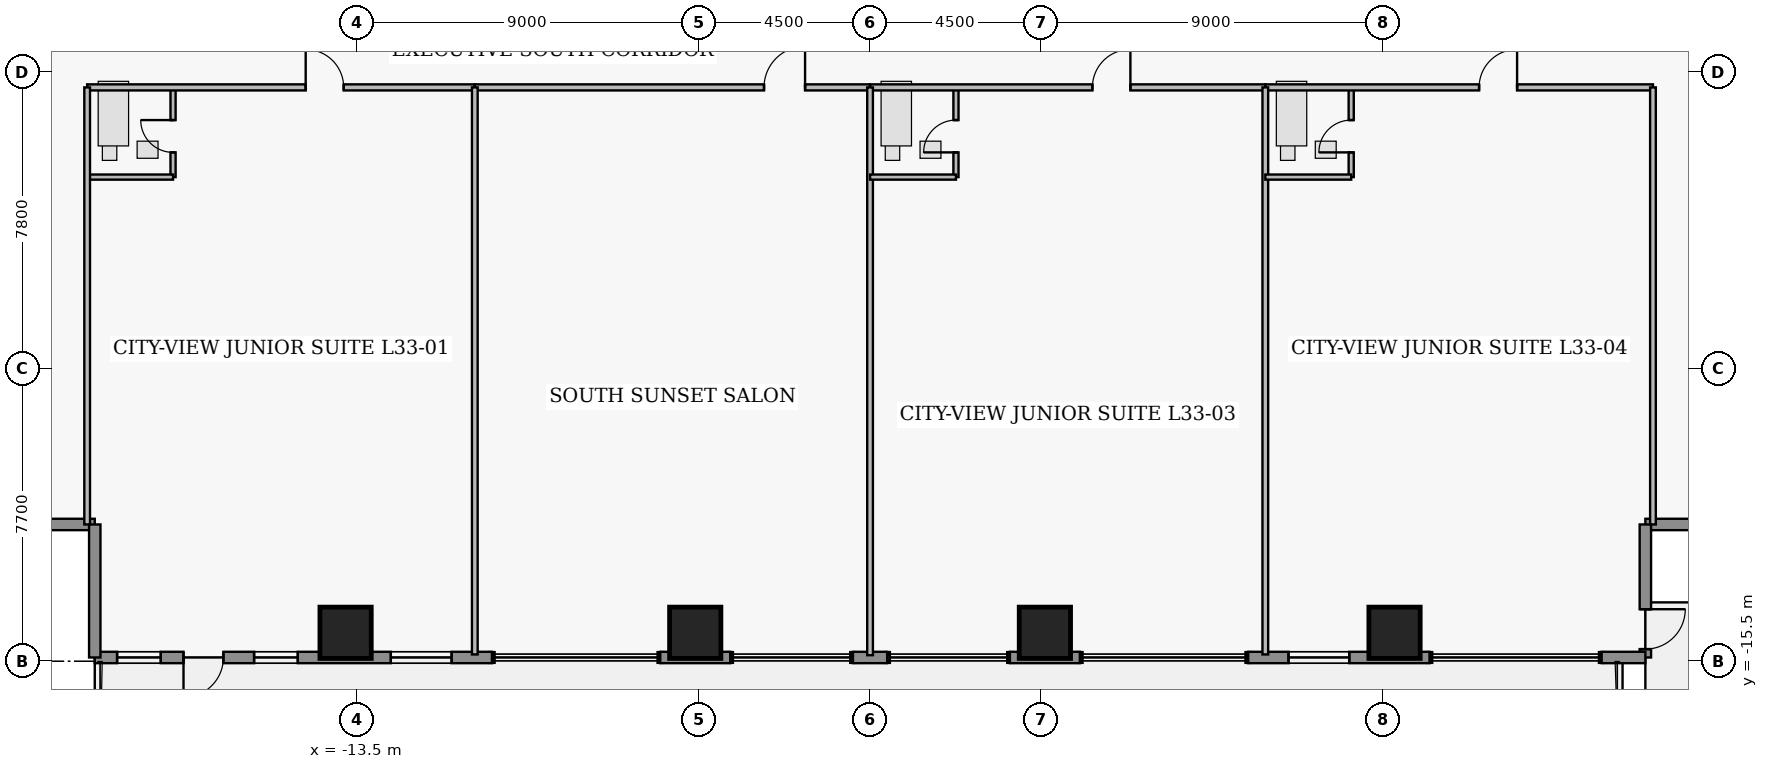
"""IFC4 building model, lengths in metres.
Left out: names, types, materials, properties, quantities, classifications, styles, units other than length and angle.
Written with IfcOpenShell. Run it as: python <this file> out.ifc"""

import sys

from ifc_helpers import new_model, si_unit, direction, frame, frame_2d, origin, origin_2d, place, context, subcontext, project, spatial, rectangle, extrude, element, fill, save


model = new_model("IFC4")
c1 = context("Model", 3, precision=1e-05, world=origin(), true_north=direction((0.0, 1.0)))
c2 = subcontext(c1, "Body", "Model", "MODEL_VIEW")
j1 = project(units=[si_unit("LENGTHUNIT", "METRE"), si_unit("PLANEANGLEUNIT", "RADIAN")], contexts=[c1])
p1 = place(None, origin())
s1 = spatial("IfcSite", under=j1, at=p1, CompositionType="ELEMENT")
p2 = place(p1, origin())
s2 = spatial("IfcBuilding", under=s1, at=p2, CompositionType="ELEMENT")
p3 = place(p2, frame((0.0, 0.0, 132.15)))
s3 = spatial("IfcBuildingStorey", under=s2, at=p3, CompositionType="ELEMENT", Elevation=132.15)
for number, where, z_axis, x_axis in (
    (1, (-13.8, -14.75, 0.0), (0.0, 0.0, 1.0), (1.0, 0.0, 0.0)),
    (2, (-4.6, -14.75, 0.0), (0.0, 0.0, 1.0), (1.0, 0.0, 0.0)),
    (3, (4.6, -14.75, 0.0), (0.0, 0.0, 1.0), (1.0, 0.0, 0.0)),
    (4, (13.8, -14.75, 0.0), (0.0, 0.0, 1.0), (1.0, 0.0, 0.0)),
):
    element("IfcColumn", number, at=place(p3, frame(where, z_axis=z_axis, x_axis=x_axis)), inside=s3, PredefinedType="COLUMN", context=c2, shape_type="SweptSolid", body=[
        extrude(rectangle(XDim=1.35, YDim=1.35, at=origin_2d()), origin(), (0.0, 0.0, 1.0), 3.65),
    ])
for number, where, z_axis, x_axis in (
    (5, (-20.4, -11.9, 0.0), (0.0, 0.0, 1.0), (-1.0, 0.0, 0.0)),
    (6, (23.9, -11.9, 0.0), (0.0, 0.0, 1.0), (-1.0, 0.0, 0.0)),
):
    element("IfcWall", number, at=place(p3, frame(where, z_axis=z_axis, x_axis=x_axis)), inside=s3, PredefinedType="STANDARD", context=c2, shape_type="SweptSolid", body=[
        extrude(rectangle(XDim=3.5, YDim=0.3, at=frame_2d((1.75, 0.0))), origin(), (0.0, 0.0, 1.0), 3.43),
    ])
p4 = place(p3, frame((20.4, -11.9, 0.0), z_axis=(0.0, 0.0, 1.0), x_axis=(0.0, -1.0, 0.0)))
e7 = element("IfcWall", 7, at=p4, inside=s3, PredefinedType="STANDARD", context=c2, shape_type="SweptSolid", body=[
    extrude(rectangle(XDim=3.5, YDim=0.3, at=frame_2d((1.75, 0.0))), origin(), (0.0, 0.0, 1.0), 3.43),
])
p5 = place(p4, frame((2.23, 0.0, 0.0)))
e8 = element("IfcOpeningElement", 8, at=p5, cuts=e7, PredefinedType="OPENING", context=c2, shape_type="SweptSolid", body=[
    extrude(rectangle(XDim=1.05, YDim=2.2, at=frame_2d((0.525, 1.1))), frame((0.0, 0.16, 0.0), z_axis=(0.0, -1.0, 0.0), x_axis=(1.0, 0.0, 0.0)), (0.0, 0.0, 1.0), 0.32),
])
p6 = place(p3, frame((20.4, -15.4, 0.0), z_axis=(0.0, 0.0, 1.0), x_axis=(-1.0, 0.0, 0.0)))
e9 = element("IfcWall", 9, at=p6, inside=s3, PredefinedType="STANDARD", context=c2, shape_type="SweptSolid", body=[
    extrude(rectangle(XDim=1.15, YDim=0.3, at=frame_2d((0.575, 0.0))), origin(), (0.0, 0.0, 1.0), 3.43),
])
p7 = place(p3, frame((14.72, -15.4, 0.0), z_axis=(0.0, 0.0, 1.0), x_axis=(-1.0, 0.0, 0.0)))
e10 = element("IfcWall", 10, at=p7, inside=s3, PredefinedType="STANDARD", context=c2, shape_type="SweptSolid", body=[
    extrude(rectangle(XDim=4.77, YDim=0.3, at=frame_2d((2.385, 0.0))), origin(), (0.0, 0.0, 1.0), 3.43),
])
p8 = place(p7, frame((2.11, 0.0, 0.85)))
e11 = element("IfcOpeningElement", 11, at=p8, cuts=e10, PredefinedType="OPENING", context=c2, shape_type="SweptSolid", body=[
    extrude(rectangle(XDim=1.6, YDim=1.8, at=frame_2d((0.8, 0.9))), frame((0.0, 0.16, 0.0), z_axis=(0.0, -1.0, 0.0), x_axis=(1.0, 0.0, 0.0)), (0.0, 0.0, 1.0), 0.32),
])
p9 = place(p3, frame((5.52, -15.4, 0.0), z_axis=(0.0, 0.0, 1.0), x_axis=(-1.0, 0.0, 0.0)))
e12 = element("IfcWall", 12, at=p9, inside=s3, PredefinedType="STANDARD", context=c2, shape_type="SweptSolid", body=[
    extrude(rectangle(XDim=1.84, YDim=0.3, at=frame_2d((0.92, 0.0))), origin(), (0.0, 0.0, 1.0), 3.43),
])
p10 = place(p3, frame((0.45, -15.4, 0.0), z_axis=(0.0, 0.0, 1.0), x_axis=(-1.0, 0.0, 0.0)))
e13 = element("IfcWall", 13, at=p10, inside=s3, PredefinedType="STANDARD", context=c2, shape_type="SweptSolid", body=[
    extrude(rectangle(XDim=0.9, YDim=0.3, at=frame_2d((0.45, 0.0))), origin(), (0.0, 0.0, 1.0), 3.43),
])
p11 = place(p3, frame((-3.68, -15.4, 0.0), z_axis=(0.0, 0.0, 1.0), x_axis=(-1.0, 0.0, 0.0)))
e14 = element("IfcWall", 14, at=p11, inside=s3, PredefinedType="STANDARD", context=c2, shape_type="SweptSolid", body=[
    extrude(rectangle(XDim=1.84, YDim=0.3, at=frame_2d((0.92, 0.0))), origin(), (0.0, 0.0, 1.0), 3.43),
])
p12 = place(p3, frame((-9.95, -15.4, 0.0), z_axis=(0.0, 0.0, 1.0), x_axis=(-1.0, 0.0, 0.0)))
e15 = element("IfcWall", 15, at=p12, inside=s3, PredefinedType="STANDARD", context=c2, shape_type="SweptSolid", body=[
    extrude(rectangle(XDim=10.45, YDim=0.3, at=frame_2d((5.225, 0.0))), origin(), (0.0, 0.0, 1.0), 3.43),
])
p13 = place(p12, frame((7.065, 0.0, 0.0)))
e16 = element("IfcOpeningElement", 16, at=p13, cuts=e15, PredefinedType="OPENING", context=c2, shape_type="SweptSolid", body=[
    extrude(rectangle(XDim=1.05, YDim=2.2, at=frame_2d((0.525, 1.1))), frame((0.0, 0.16, 0.0), z_axis=(0.0, -1.0, 0.0), x_axis=(1.0, 0.0, 0.0)), (0.0, 0.0, 1.0), 0.32),
])
p14 = place(p12, frame((1.06, 0.0, 0.85)))
e17 = element("IfcOpeningElement", 17, at=p14, cuts=e15, PredefinedType="OPENING", context=c2, shape_type="SweptSolid", body=[
    extrude(rectangle(XDim=1.6, YDim=1.8, at=frame_2d((0.8, 0.9))), frame((0.0, 0.16, 0.0), z_axis=(0.0, -1.0, 0.0), x_axis=(1.0, 0.0, 0.0)), (0.0, 0.0, 1.0), 0.32),
])
p15 = place(p12, frame((5.107, 0.0, 0.95)))
e18 = element("IfcOpeningElement", 18, at=p15, cuts=e15, PredefinedType="OPENING", context=c2, shape_type="SweptSolid", body=[
    extrude(rectangle(XDim=1.15, YDim=1.55, at=frame_2d((0.575, 0.775))), frame((0.0, 0.16, 0.0), z_axis=(0.0, -1.0, 0.0), x_axis=(1.0, 0.0, 0.0)), (0.0, 0.0, 1.0), 0.32),
])
p16 = place(p12, frame((8.712, 0.0, 0.95)))
e19 = element("IfcOpeningElement", 19, at=p16, cuts=e15, PredefinedType="OPENING", context=c2, shape_type="SweptSolid", body=[
    extrude(rectangle(XDim=1.15, YDim=1.55, at=frame_2d((0.575, 0.775))), frame((0.0, 0.16, 0.0), z_axis=(0.0, -1.0, 0.0), x_axis=(1.0, 0.0, 0.0)), (0.0, 0.0, 1.0), 0.32),
])
p17 = place(p3, frame((-20.4, -15.4, 0.0), z_axis=(0.0, 0.0, 1.0), x_axis=(0.0, 1.0, 0.0)))
e20 = element("IfcWall", 20, at=p17, inside=s3, PredefinedType="STANDARD", context=c2, shape_type="SweptSolid", body=[
    extrude(rectangle(XDim=3.5, YDim=0.3, at=frame_2d((1.75, 0.0))), origin(), (0.0, 0.0, 1.0), 3.43),
])
p18 = place(p3, frame((-18.34, -2.76, 0.0), z_axis=(0.0, 0.0, 1.0), x_axis=(0.0, 1.0, 0.0)))
e21 = element("IfcWall", 21, at=p18, inside=s3, PredefinedType="PLUMBINGWALL", context=c2, shape_type="SweptSolid", body=[
    extrude(rectangle(XDim=2.36, YDim=0.135, at=frame_2d((1.18, 0.0))), origin(), (0.0, 0.0, 1.0), 3.43),
])
p19 = place(p18, frame((0.65, 0.0, 0.0)))
e22 = element("IfcOpeningElement", 22, at=p19, cuts=e21, PredefinedType="OPENING", context=c2, shape_type="SweptSolid", body=[
    extrude(rectangle(XDim=0.85, YDim=2.1, at=frame_2d((0.425, 1.05))), frame((0.0, 0.077, 0.0), z_axis=(0.0, -1.0, 0.0), x_axis=(1.0, 0.0, 0.0)), (0.0, 0.0, 1.0), 0.155),
])
p20 = place(p3, frame((-20.6, -0.4, 0.0), z_axis=(0.0, 0.0, 1.0), x_axis=(1.0, 0.0, 0.0)))
e23 = element("IfcWall", 23, at=p20, inside=s3, PredefinedType="PARTITIONING", context=c2, shape_type="SweptSolid", body=[
    extrude(rectangle(XDim=10.2, YDim=0.16, at=frame_2d((5.1, 0.0))), origin(), (0.0, 0.0, 1.0), 3.43),
])
p21 = place(p20, frame((5.75, 0.0, 0.0)))
e24 = element("IfcOpeningElement", 24, at=p21, cuts=e23, PredefinedType="OPENING", context=c2, shape_type="SweptSolid", body=[
    extrude(rectangle(XDim=1.0, YDim=2.15, at=frame_2d((0.5, 1.075))), frame((0.0, 0.09, 0.0), z_axis=(0.0, -1.0, 0.0), x_axis=(1.0, 0.0, 0.0)), (0.0, 0.0, 1.0), 0.18),
])
p22 = place(p3, frame((-10.4, -0.4, 0.0), z_axis=(0.0, 0.0, 1.0), x_axis=(1.0, 0.0, 0.0)))
e25 = element("IfcWall", 25, at=p22, inside=s3, PredefinedType="PARTITIONING", context=c2, shape_type="SweptSolid", body=[
    extrude(rectangle(XDim=10.4, YDim=0.16, at=frame_2d((5.2, 0.0))), origin(), (0.0, 0.0, 1.0), 3.43),
])
p23 = place(p22, frame((7.61, 0.0, 0.0)))
e26 = element("IfcOpeningElement", 26, at=p23, cuts=e25, PredefinedType="OPENING", context=c2, shape_type="SweptSolid", body=[
    extrude(rectangle(XDim=1.08, YDim=2.18, at=frame_2d((0.54, 1.09))), frame((0.0, 0.09, 0.0), z_axis=(0.0, -1.0, 0.0), x_axis=(1.0, 0.0, 0.0)), (0.0, 0.0, 1.0), 0.18),
])
p24 = place(p3, frame((2.26, -2.76, 0.0), z_axis=(0.0, 0.0, 1.0), x_axis=(0.0, 1.0, 0.0)))
e27 = element("IfcWall", 27, at=p24, inside=s3, PredefinedType="PLUMBINGWALL", context=c2, shape_type="SweptSolid", body=[
    extrude(rectangle(XDim=2.36, YDim=0.135, at=frame_2d((1.18, 0.0))), origin(), (0.0, 0.0, 1.0), 3.43),
])
p25 = place(p24, frame((0.65, 0.0, 0.0)))
e28 = element("IfcOpeningElement", 28, at=p25, cuts=e27, PredefinedType="OPENING", context=c2, shape_type="SweptSolid", body=[
    extrude(rectangle(XDim=0.85, YDim=2.1, at=frame_2d((0.425, 1.05))), frame((0.0, 0.077, 0.0), z_axis=(0.0, -1.0, 0.0), x_axis=(1.0, 0.0, 0.0)), (0.0, 0.0, 1.0), 0.155),
])
p26 = place(p3, frame((0.0, -0.4, 0.0), z_axis=(0.0, 0.0, 1.0), x_axis=(1.0, 0.0, 0.0)))
e29 = element("IfcWall", 29, at=p26, inside=s3, PredefinedType="PARTITIONING", context=c2, shape_type="SweptSolid", body=[
    extrude(rectangle(XDim=10.4, YDim=0.16, at=frame_2d((5.2, 0.0))), origin(), (0.0, 0.0, 1.0), 3.43),
])
p27 = place(p26, frame((5.85, 0.0, 0.0)))
e30 = element("IfcOpeningElement", 30, at=p27, cuts=e29, PredefinedType="OPENING", context=c2, shape_type="SweptSolid", body=[
    extrude(rectangle(XDim=1.0, YDim=2.15, at=frame_2d((0.5, 1.075))), frame((0.0, 0.09, 0.0), z_axis=(0.0, -1.0, 0.0), x_axis=(1.0, 0.0, 0.0)), (0.0, 0.0, 1.0), 0.18),
])
p28 = place(p3, frame((12.66, -2.76, 0.0), z_axis=(0.0, 0.0, 1.0), x_axis=(0.0, 1.0, 0.0)))
e31 = element("IfcWall", 31, at=p28, inside=s3, PredefinedType="PLUMBINGWALL", context=c2, shape_type="SweptSolid", body=[
    extrude(rectangle(XDim=2.36, YDim=0.135, at=frame_2d((1.18, 0.0))), origin(), (0.0, 0.0, 1.0), 3.43),
])
p29 = place(p28, frame((0.65, 0.0, 0.0)))
e32 = element("IfcOpeningElement", 32, at=p29, cuts=e31, PredefinedType="OPENING", context=c2, shape_type="SweptSolid", body=[
    extrude(rectangle(XDim=0.85, YDim=2.1, at=frame_2d((0.425, 1.05))), frame((0.0, 0.077, 0.0), z_axis=(0.0, -1.0, 0.0), x_axis=(1.0, 0.0, 0.0)), (0.0, 0.0, 1.0), 0.155),
])
p30 = place(p3, frame((10.4, -0.4, 0.0), z_axis=(0.0, 0.0, 1.0), x_axis=(1.0, 0.0, 0.0)))
e33 = element("IfcWall", 33, at=p30, inside=s3, PredefinedType="PARTITIONING", context=c2, shape_type="SweptSolid", body=[
    extrude(rectangle(XDim=10.2, YDim=0.16, at=frame_2d((5.1, 0.0))), origin(), (0.0, 0.0, 1.0), 3.43),
])
p31 = place(p30, frame((5.625, 0.0, 0.0)))
e34 = element("IfcOpeningElement", 34, at=p31, cuts=e33, PredefinedType="OPENING", context=c2, shape_type="SweptSolid", body=[
    extrude(rectangle(XDim=1.0, YDim=2.15, at=frame_2d((0.5, 1.075))), frame((0.0, 0.09, 0.0), z_axis=(0.0, -1.0, 0.0), x_axis=(1.0, 0.0, 0.0)), (0.0, 0.0, 1.0), 0.18),
])
p32 = place(p3, frame((-20.6, -2.76, 0.0), z_axis=(0.0, 0.0, 1.0), x_axis=(1.0, 0.0, 0.0)))
e35 = element("IfcWall", 35, at=p32, inside=s3, PredefinedType="PLUMBINGWALL", context=c2, shape_type="SweptSolid", body=[
    extrude(rectangle(XDim=2.26, YDim=0.135, at=frame_2d((1.13, 0.0))), origin(), (0.0, 0.0, 1.0), 3.43),
])
p33 = place(p3, frame((-20.6, -11.9, 0.0), z_axis=(0.0, 0.0, 1.0), x_axis=(0.0, 1.0, 0.0)))
e36 = element("IfcWall", 36, at=p33, inside=s3, PredefinedType="PARTITIONING", context=c2, shape_type="SweptSolid", body=[
    extrude(rectangle(XDim=11.5, YDim=0.15, at=frame_2d((5.75, 0.0))), origin(), (0.0, 0.0, 1.0), 3.43),
])
p34 = place(p3, frame((-10.4, -15.32, 0.0), z_axis=(0.0, 0.0, 1.0), x_axis=(0.0, 1.0, 0.0)))
e37 = element("IfcWall", 37, at=p34, inside=s3, PredefinedType="PARTITIONING", context=c2, shape_type="SweptSolid", body=[
    extrude(rectangle(XDim=14.92, YDim=0.15, at=frame_2d((7.46, 0.0))), origin(), (0.0, 0.0, 1.0), 3.43),
])
p35 = place(p3, frame((0.0, -15.34, 0.0), z_axis=(0.0, 0.0, 1.0), x_axis=(0.0, 1.0, 0.0)))
e38 = element("IfcWall", 38, at=p35, inside=s3, PredefinedType="PARTITIONING", context=c2, shape_type="SweptSolid", body=[
    extrude(rectangle(XDim=14.94, YDim=0.15, at=frame_2d((7.47, 0.0))), origin(), (0.0, 0.0, 1.0), 3.43),
])
p36 = place(p3, frame((0.0, -2.76, 0.0), z_axis=(0.0, 0.0, 1.0), x_axis=(1.0, 0.0, 0.0)))
e39 = element("IfcWall", 39, at=p36, inside=s3, PredefinedType="PLUMBINGWALL", context=c2, shape_type="SweptSolid", body=[
    extrude(rectangle(XDim=2.26, YDim=0.135, at=frame_2d((1.13, 0.0))), origin(), (0.0, 0.0, 1.0), 3.43),
])
p37 = place(p3, frame((10.4, -15.32, 0.0), z_axis=(0.0, 0.0, 1.0), x_axis=(0.0, 1.0, 0.0)))
e40 = element("IfcWall", 40, at=p37, inside=s3, PredefinedType="PARTITIONING", context=c2, shape_type="SweptSolid", body=[
    extrude(rectangle(XDim=14.92, YDim=0.15, at=frame_2d((7.46, 0.0))), origin(), (0.0, 0.0, 1.0), 3.43),
])
p38 = place(p3, frame((10.4, -2.76, 0.0), z_axis=(0.0, 0.0, 1.0), x_axis=(1.0, 0.0, 0.0)))
e41 = element("IfcWall", 41, at=p38, inside=s3, PredefinedType="PLUMBINGWALL", context=c2, shape_type="SweptSolid", body=[
    extrude(rectangle(XDim=2.26, YDim=0.135, at=frame_2d((1.13, 0.0))), origin(), (0.0, 0.0, 1.0), 3.43),
])
p39 = place(p3, frame((20.6, -11.9, 0.0), z_axis=(0.0, 0.0, 1.0), x_axis=(0.0, 1.0, 0.0)))
e42 = element("IfcWall", 42, at=p39, inside=s3, PredefinedType="PARTITIONING", context=c2, shape_type="SweptSolid", body=[
    extrude(rectangle(XDim=11.5, YDim=0.15, at=frame_2d((5.75, 0.0))), origin(), (0.0, 0.0, 1.0), 3.43),
])
p40 = place(p5, origin())
e43 = element("IfcDoor", 43, at=p40, inside=s3, OperationType="SINGLE_SWING_LEFT", PredefinedType="DOOR", context=c2, shape_type="SweptSolid", body=[
    extrude(rectangle(XDim=1.05, YDim=2.2, at=frame_2d((0.525, 1.1))), frame((0.0, 0.025, 0.0), z_axis=(0.0, -1.0, 0.0), x_axis=(1.0, 0.0, 0.0)), (0.0, 0.0, 1.0), 0.05),
])
fill(e8, e43)
p41 = place(p8, origin())
e44 = element("IfcWindow", 44, at=p41, inside=s3, PartitioningType="SINGLE_PANEL", PredefinedType="WINDOW", context=c2, shape_type="SweptSolid", body=[
    extrude(rectangle(XDim=1.6, YDim=1.8, at=frame_2d((0.8, 0.9))), frame((0.0, 0.03, 0.0), z_axis=(0.0, -1.0, 0.0), x_axis=(1.0, 0.0, 0.0)), (0.0, 0.0, 1.0), 0.06),
])
fill(e11, e44)
p42 = place(p13, origin())
e45 = element("IfcDoor", 45, at=p42, inside=s3, OperationType="SINGLE_SWING_RIGHT", PredefinedType="DOOR", context=c2, shape_type="SweptSolid", body=[
    extrude(rectangle(XDim=1.05, YDim=2.2, at=frame_2d((0.525, 1.1))), frame((0.0, 0.025, 0.0), z_axis=(0.0, -1.0, 0.0), x_axis=(1.0, 0.0, 0.0)), (0.0, 0.0, 1.0), 0.05),
])
fill(e16, e45)
p43 = place(p14, origin())
e46 = element("IfcWindow", 46, at=p43, inside=s3, PartitioningType="SINGLE_PANEL", PredefinedType="WINDOW", context=c2, shape_type="SweptSolid", body=[
    extrude(rectangle(XDim=1.6, YDim=1.8, at=frame_2d((0.8, 0.9))), frame((0.0, 0.03, 0.0), z_axis=(0.0, -1.0, 0.0), x_axis=(1.0, 0.0, 0.0)), (0.0, 0.0, 1.0), 0.06),
])
fill(e17, e46)
p44 = place(p15, origin())
e47 = element("IfcWindow", 47, at=p44, inside=s3, PartitioningType="SINGLE_PANEL", PredefinedType="WINDOW", context=c2, shape_type="SweptSolid", body=[
    extrude(rectangle(XDim=1.15, YDim=1.55, at=frame_2d((0.575, 0.775))), frame((0.0, 0.03, 0.0), z_axis=(0.0, -1.0, 0.0), x_axis=(1.0, 0.0, 0.0)), (0.0, 0.0, 1.0), 0.06),
])
fill(e18, e47)
p45 = place(p16, origin())
e48 = element("IfcWindow", 48, at=p45, inside=s3, PartitioningType="SINGLE_PANEL", PredefinedType="WINDOW", context=c2, shape_type="SweptSolid", body=[
    extrude(rectangle(XDim=1.15, YDim=1.55, at=frame_2d((0.575, 0.775))), frame((0.0, 0.03, 0.0), z_axis=(0.0, -1.0, 0.0), x_axis=(1.0, 0.0, 0.0)), (0.0, 0.0, 1.0), 0.06),
])
fill(e19, e48)
p46 = place(p19, origin())
e49 = element("IfcDoor", 49, at=p46, inside=s3, OperationType="SINGLE_SWING_RIGHT", PredefinedType="DOOR", context=c2, shape_type="SweptSolid", body=[
    extrude(rectangle(XDim=0.85, YDim=2.1, at=frame_2d((0.425, 1.05))), frame((0.0, 0.025, 0.0), z_axis=(0.0, -1.0, 0.0), x_axis=(1.0, 0.0, 0.0)), (0.0, 0.0, 1.0), 0.05),
])
fill(e22, e49)
p47 = place(p21, origin())
e50 = element("IfcDoor", 50, at=p47, inside=s3, OperationType="SINGLE_SWING_LEFT", PredefinedType="DOOR", context=c2, shape_type="SweptSolid", body=[
    extrude(rectangle(XDim=1.0, YDim=2.15, at=frame_2d((0.5, 1.075))), frame((0.0, 0.025, 0.0), z_axis=(0.0, -1.0, 0.0), x_axis=(1.0, 0.0, 0.0)), (0.0, 0.0, 1.0), 0.05),
])
fill(e24, e50)
p48 = place(p23, origin())
e51 = element("IfcDoor", 51, at=p48, inside=s3, OperationType="SINGLE_SWING_RIGHT", PredefinedType="DOOR", context=c2, shape_type="SweptSolid", body=[
    extrude(rectangle(XDim=1.08, YDim=2.18, at=frame_2d((0.54, 1.09))), frame((0.0, 0.025, 0.0), z_axis=(0.0, -1.0, 0.0), x_axis=(1.0, 0.0, 0.0)), (0.0, 0.0, 1.0), 0.05),
])
fill(e26, e51)
p49 = place(p25, origin())
e52 = element("IfcDoor", 52, at=p49, inside=s3, OperationType="SINGLE_SWING_LEFT", PredefinedType="DOOR", context=c2, shape_type="SweptSolid", body=[
    extrude(rectangle(XDim=0.85, YDim=2.1, at=frame_2d((0.425, 1.05))), frame((0.0, 0.025, 0.0), z_axis=(0.0, -1.0, 0.0), x_axis=(1.0, 0.0, 0.0)), (0.0, 0.0, 1.0), 0.05),
])
fill(e28, e52)
p50 = place(p27, origin())
e53 = element("IfcDoor", 53, at=p50, inside=s3, OperationType="SINGLE_SWING_RIGHT", PredefinedType="DOOR", context=c2, shape_type="SweptSolid", body=[
    extrude(rectangle(XDim=1.0, YDim=2.15, at=frame_2d((0.5, 1.075))), frame((0.0, 0.025, 0.0), z_axis=(0.0, -1.0, 0.0), x_axis=(1.0, 0.0, 0.0)), (0.0, 0.0, 1.0), 0.05),
])
fill(e30, e53)
p51 = place(p29, origin())
e54 = element("IfcDoor", 54, at=p51, inside=s3, OperationType="SINGLE_SWING_LEFT", PredefinedType="DOOR", context=c2, shape_type="SweptSolid", body=[
    extrude(rectangle(XDim=0.85, YDim=2.1, at=frame_2d((0.425, 1.05))), frame((0.0, 0.025, 0.0), z_axis=(0.0, -1.0, 0.0), x_axis=(1.0, 0.0, 0.0)), (0.0, 0.0, 1.0), 0.05),
])
fill(e32, e54)
p52 = place(p31, origin())
e55 = element("IfcDoor", 55, at=p52, inside=s3, OperationType="SINGLE_SWING_RIGHT", PredefinedType="DOOR", context=c2, shape_type="SweptSolid", body=[
    extrude(rectangle(XDim=1.0, YDim=2.15, at=frame_2d((0.5, 1.075))), frame((0.0, 0.025, 0.0), z_axis=(0.0, -1.0, 0.0), x_axis=(1.0, 0.0, 0.0)), (0.0, 0.0, 1.0), 0.05),
])
fill(e34, e55)
save(model, sys.argv[1])
